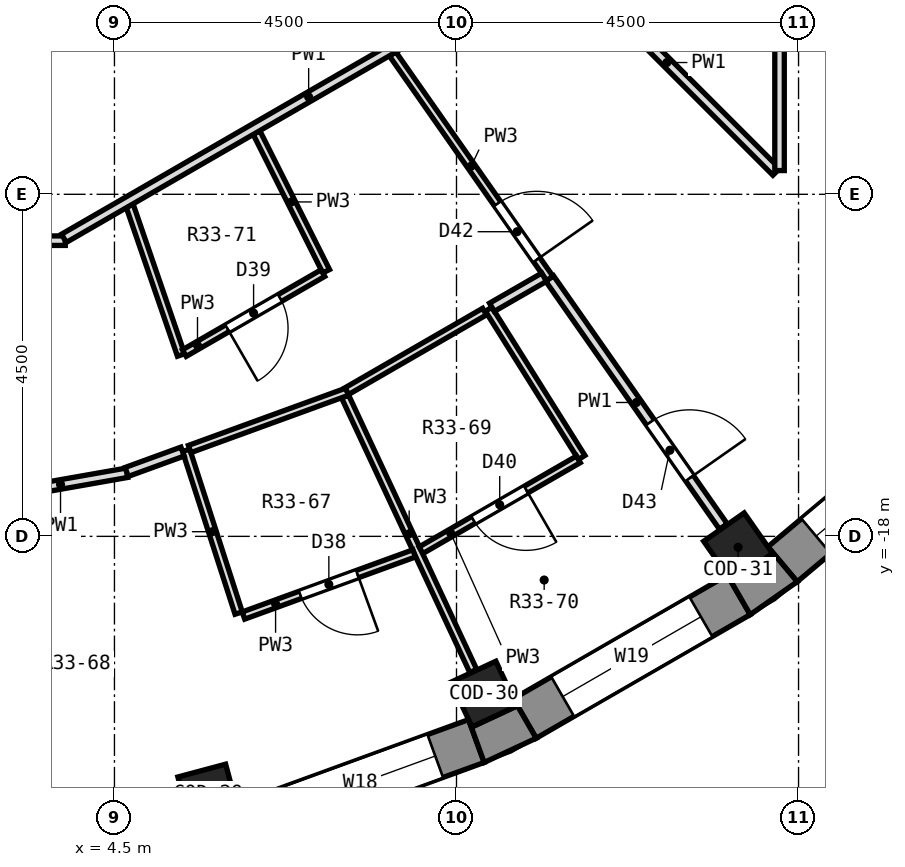
"""IFC4 building model, lengths in metres.
Left out: names, types, materials, properties, quantities, classifications, styles, units other than length and angle.
Written with IfcOpenShell. Run it as: python <this file> out.ifc"""

import sys

from ifc_helpers import new_model, si_unit, direction, frame, frame_2d, origin, origin_2d, place, context, subcontext, project, spatial, polyline, rectangle, outline, extrude, element, fill, save


model = new_model("IFC4")
c1 = context("Model", 3, precision=1e-05, world=origin(), true_north=direction((0.0, 1.0)))
c2 = subcontext(c1, "Body", "Model", "MODEL_VIEW")
j1 = project(units=[si_unit("LENGTHUNIT", "METRE"), si_unit("PLANEANGLEUNIT", "RADIAN")], contexts=[c1])
p1 = place(None, origin())
s1 = spatial("IfcSite", under=j1, at=p1, CompositionType="ELEMENT")
p2 = place(p1, origin())
s2 = spatial("IfcBuilding", under=s1, at=p2, CompositionType="ELEMENT")
p3 = place(p2, frame((0.0, 0.0, 229.7)))
s3 = spatial("IfcBuildingStorey", under=s2, at=p3, CompositionType="ELEMENT", Elevation=229.7)
for number, where, z_axis, x_axis in (
    (1, (5.733, -21.395, 0.0), (0.0, 0.0, 1.0), (0.259, -0.966, 0.0)),
    (2, (9.361, -20.075, 0.0), (0.0, 0.0, 1.0), (0.423, -0.906, 0.0)),
    (3, (12.705, -18.144, 0.0), (0.0, 0.0, 1.0), (0.574, -0.819, 0.0)),
):
    element("IfcColumn", number, at=place(p3, frame(where, z_axis=z_axis, x_axis=x_axis)), inside=s3, PredefinedType="COLUMN", context=c2, shape_type="SweptSolid", body=[
        extrude(rectangle(XDim=0.65, YDim=0.65, at=origin_2d()), origin(), (0.0, 0.0, 1.0), 3.3),
    ])
p4 = place(p3, frame((6.206, -21.805, 0.0), z_axis=(0.0, 0.0, 1.0), x_axis=(0.939679383794, 0.342056509473, 0.0)))
e4 = element("IfcWall", 4, at=p4, inside=s3, PredefinedType="SOLIDWALL", context=c2, shape_type="SweptSolid", body=[
    extrude(rectangle(XDim=3.252, YDim=0.6, at=frame_2d((1.626, 0.0))), origin(), (0.0, 0.0, 1.0), 2.9),
])
p5 = place(p4, frame((0.576, 0.0, 0.9)))
e5 = element("IfcOpeningElement", 5, at=p5, cuts=e4, PredefinedType="OPENING", context=c2, shape_type="SweptSolid", body=[
    extrude(rectangle(XDim=2.1, YDim=1.8, at=frame_2d((1.05, 0.9))), frame((0.0, 0.312, 0.0), z_axis=(0.0, -1.0, 0.0), x_axis=(1.0, 0.0, 0.0)), (0.0, 0.0, 1.0), 0.624),
])
p6 = place(p3, frame((9.898, -20.396, 0.0), z_axis=(0.0, 0.0, 1.0), x_axis=(0.866016800201, 0.500014901547, 0.0)))
e6 = element("IfcWall", 6, at=p6, inside=s3, PredefinedType="SOLIDWALL", context=c2, shape_type="SweptSolid", body=[
    extrude(rectangle(XDim=3.252, YDim=0.6, at=frame_2d((1.626, 0.0))), origin(), (0.0, 0.0, 1.0), 2.9),
])
p7 = place(p6, frame((0.576, 0.0, 0.9)))
e7 = element("IfcOpeningElement", 7, at=p7, cuts=e6, PredefinedType="OPENING", context=c2, shape_type="SweptSolid", body=[
    extrude(rectangle(XDim=2.1, YDim=1.8, at=frame_2d((1.05, 0.9))), frame((0.0, 0.312, 0.0), z_axis=(0.0, -1.0, 0.0), x_axis=(1.0, 0.0, 0.0)), (0.0, 0.0, 1.0), 0.624),
])
p8 = place(p3, frame((13.29, -18.367, 0.0), z_axis=(0.0, 0.0, 1.0), x_axis=(0.766056773982, 0.64277291405, 0.0)))
e8 = element("IfcWall", 8, at=p8, inside=s3, PredefinedType="SOLIDWALL", context=c2, shape_type="SweptSolid", body=[
    extrude(rectangle(XDim=3.252, YDim=0.6, at=frame_2d((1.626, 0.0))), origin(), (0.0, 0.0, 1.0), 2.9),
])
p9 = place(p8, frame((0.576, 0.0, 0.9)))
e9 = element("IfcOpeningElement", 9, at=p9, cuts=e8, PredefinedType="OPENING", context=c2, shape_type="SweptSolid", body=[
    extrude(rectangle(XDim=2.1, YDim=1.8, at=frame_2d((1.05, 0.9))), frame((0.0, 0.312, 0.0), z_axis=(0.0, -1.0, 0.0), x_axis=(1.0, 0.0, 0.0)), (0.0, 0.0, 1.0), 0.624),
])
p10 = place(p3, origin())
e10 = element("IfcWall", 10, at=p10, inside=s3, PredefinedType="SOLIDWALL", context=c2, shape_type="SweptSolid", body=[
    extrude(outline(polyline([(9.364, -20.975), (10.048, -20.656), (9.748, -20.136), (9.793, -20.232), (9.204, -20.507), (9.159, -20.411), (9.364, -20.975)])), origin(), (0.0, 0.0, 1.0), 2.9),
])
p11 = place(p3, origin())
e11 = element("IfcWall", 11, at=p11, inside=s3, PredefinedType="SOLIDWALL", context=c2, shape_type="SweptSolid", body=[
    extrude(outline(polyline([(12.864, -19.03), (13.482, -18.597), (13.097, -18.137), (13.157, -18.224), (12.625, -18.597), (12.564, -18.51), (12.864, -19.03)])), origin(), (0.0, 0.0, 1.0), 2.9),
])
p12 = place(p3, frame((5.443, -16.868, 0.0), z_axis=(0.0, 0.0, 1.0), x_axis=(0.307034478859, -0.951698391714, 0.0)))
e12 = element("IfcWall", 12, at=p12, inside=s3, PredefinedType="PARTITIONING", context=c2, shape_type="SweptSolid", body=[
    extrude(rectangle(XDim=2.25, YDim=0.1, at=frame_2d((1.125, 0.0))), origin(), (0.0, 0.0, 1.0), 2.9),
])
p13 = place(p3, frame((4.7, -13.65, 0.0), z_axis=(0.0, 0.0, 1.0), x_axis=(0.325276885577, -0.945618817341, 0.0)))
e13 = element("IfcWall", 13, at=p13, inside=s3, PredefinedType="PARTITIONING", context=c2, shape_type="SweptSolid", body=[
    extrude(rectangle(XDim=2.077, YDim=0.1, at=frame_2d((1.039, 0.0))), origin(), (0.0, 0.0, 1.0), 2.9),
])
p14 = place(p3, frame((7.534, -16.16, 0.0), z_axis=(0.0, 0.0, 1.0), x_axis=(0.423136981181, -0.90606572342, 0.0)))
e14 = element("IfcWall", 14, at=p14, inside=s3, PredefinedType="PARTITIONING", context=c2, shape_type="SweptSolid", body=[
    extrude(rectangle(XDim=3.985, YDim=0.1, at=frame_2d((1.993, 0.0))), origin(), (0.0, 0.0, 1.0), 2.9),
])
p15 = place(p3, frame((6.369, -12.688, 0.0), z_axis=(0.0, 0.0, 1.0), x_axis=(0.448648311547, -0.893708393463, 0.0)))
e15 = element("IfcWall", 15, at=p15, inside=s3, PredefinedType="PARTITIONING", context=c2, shape_type="SweptSolid", body=[
    extrude(rectangle(XDim=2.041, YDim=0.1, at=frame_2d((1.021, 0.0))), origin(), (0.0, 0.0, 1.0), 2.9),
])
p16 = place(p3, frame((9.423, -15.012, 0.0), z_axis=(0.0, 0.0, 1.0), x_axis=(0.531608930636, -0.846989931975, 0.0)))
e16 = element("IfcWall", 16, at=p16, inside=s3, PredefinedType="PARTITIONING", context=c2, shape_type="SweptSolid", body=[
    extrude(rectangle(XDim=2.302, YDim=0.1, at=frame_2d((1.151, 0.0))), origin(), (0.0, 0.0, 1.0), 2.9),
])
p17 = place(p3, frame((10.225, -14.607, 0.0), z_axis=(0.0, 0.0, 1.0), x_axis=(0.573696694948, -0.819067825156, 0.0)))
e17 = element("IfcWall", 17, at=p17, inside=s3, PredefinedType="PARTITIONING", context=c2, shape_type="SweptSolid", body=[
    extrude(rectangle(XDim=3.985, YDim=0.125, at=frame_2d((1.992, 0.0))), origin(), (0.0, 0.0, 1.0), 2.9),
])
p18 = place(p17, frame((2.309, 0.0, 0.0)))
e18 = element("IfcOpeningElement", 18, at=p18, cuts=e17, PredefinedType="OPENING", context=c2, shape_type="SweptSolid", body=[
    extrude(rectangle(XDim=0.9, YDim=2.1, at=frame_2d((0.45, 1.05))), frame((0.0, 0.074, 0.0), z_axis=(0.0, -1.0, 0.0), x_axis=(1.0, 0.0, 0.0)), (0.0, 0.0, 1.0), 0.149),
])
p19 = place(p3, frame((8.16, -11.654, 0.0), z_axis=(0.0, 0.0, 1.0), x_axis=(0.573580547772, -0.819149165426, 0.0)))
e19 = element("IfcWall", 19, at=p19, inside=s3, PredefinedType="PARTITIONING", context=c2, shape_type="SweptSolid", body=[
    extrude(rectangle(XDim=3.604, YDim=0.1, at=frame_2d((1.802, 0.0))), origin(), (0.0, 0.0, 1.0), 2.9),
])
p20 = place(p19, frame((2.405, 0.0, 0.0)))
e20 = element("IfcOpeningElement", 20, at=p20, cuts=e19, PredefinedType="OPENING", context=c2, shape_type="SweptSolid", body=[
    extrude(rectangle(XDim=0.9, YDim=2.1, at=frame_2d((0.45, 1.05))), frame((0.0, 0.062, 0.0), z_axis=(0.0, -1.0, 0.0), x_axis=(1.0, 0.0, 0.0)), (0.0, 0.0, 1.0), 0.124),
])
p21 = place(p3, frame((10.33, -10.328, 0.0), z_axis=(0.0, 0.0, 1.0), x_axis=(0.707076776443, -0.707136784657, 0.0)))
e21 = element("IfcWall", 21, at=p21, inside=s3, PredefinedType="PARTITIONING", context=c2, shape_type="SweptSolid", body=[
    extrude(rectangle(XDim=4.068, YDim=0.125, at=frame_2d((2.034, 0.0))), origin(), (0.0, 0.0, 1.0), 2.9),
])
p22 = place(p3, frame((-3.719, -14.11, 0.0), z_axis=(0.0, 0.0, 1.0), x_axis=(1.0, 0.0, 0.0)))
e22 = element("IfcWall", 22, at=p22, inside=s3, PredefinedType="PARTITIONING", context=c2, shape_type="SweptSolid", body=[
    extrude(rectangle(XDim=7.572, YDim=0.125, at=frame_2d((3.786, 0.0))), origin(), (0.0, 0.0, 1.0), 2.9),
])
p23 = place(p22, frame((0.926, 0.0, 0.0)))
e23 = element("IfcOpeningElement", 23, at=p23, cuts=e22, PredefinedType="OPENING", context=c2, shape_type="SweptSolid", body=[
    extrude(rectangle(XDim=1.0, YDim=2.1, at=frame_2d((0.5, 1.05))), frame((0.0, 0.074, 0.0), z_axis=(0.0, -1.0, 0.0), x_axis=(1.0, 0.0, 0.0)), (0.0, 0.0, 1.0), 0.149),
])
p24 = place(p22, frame((4.492, 0.0, 0.0)))
e24 = element("IfcOpeningElement", 24, at=p24, cuts=e22, PredefinedType="OPENING", context=c2, shape_type="SweptSolid", body=[
    extrude(rectangle(XDim=1.0, YDim=2.1, at=frame_2d((0.5, 1.05))), frame((0.0, 0.074, 0.0), z_axis=(0.0, -1.0, 0.0), x_axis=(1.0, 0.0, 0.0)), (0.0, 0.0, 1.0), 0.149),
])
p25 = place(p3, frame((1.624, -17.699, 0.0), z_axis=(0.0, 0.0, 1.0), x_axis=(0.98485035276, 0.17340640896, 0.0)))
e25 = element("IfcWall", 25, at=p25, inside=s3, PredefinedType="PARTITIONING", context=c2, shape_type="SweptSolid", body=[
    extrude(rectangle(XDim=3.088, YDim=0.125, at=frame_2d((1.544, 0.0))), origin(), (0.0, 0.0, 1.0), 2.9),
])
p26 = place(p25, frame((1.024, 0.0, 0.0)))
e26 = element("IfcOpeningElement", 26, at=p26, cuts=e25, PredefinedType="OPENING", context=c2, shape_type="SweptSolid", body=[
    extrude(rectangle(XDim=0.9, YDim=2.1, at=frame_2d((0.45, 1.05))), frame((0.0, 0.074, 0.0), z_axis=(0.0, -1.0, 0.0), x_axis=(1.0, 0.0, 0.0)), (0.0, 0.0, 1.0), 0.149),
])
p27 = place(p3, frame((6.197, -19.042, 0.0), z_axis=(0.0, 0.0, 1.0), x_axis=(0.939644231496, 0.342153062556, 0.0)))
e27 = element("IfcWall", 27, at=p27, inside=s3, PredefinedType="PARTITIONING", context=c2, shape_type="SweptSolid", body=[
    extrude(rectangle(XDim=2.39, YDim=0.1, at=frame_2d((1.195, 0.0))), origin(), (0.0, 0.0, 1.0), 2.9),
])
p28 = place(p27, frame((0.796, 0.0, 0.0)))
e28 = element("IfcOpeningElement", 28, at=p28, cuts=e27, PredefinedType="OPENING", context=c2, shape_type="SweptSolid", body=[
    extrude(rectangle(XDim=0.8, YDim=2.1, at=frame_2d((0.4, 1.05))), frame((0.0, 0.062, 0.0), z_axis=(0.0, -1.0, 0.0), x_axis=(1.0, 0.0, 0.0)), (0.0, 0.0, 1.0), 0.124),
])
p29 = place(p3, frame((5.49, -16.851, 0.0), z_axis=(0.0, 0.0, 1.0), x_axis=(0.939680214162, 0.342054228323, 0.0)))
e29 = element("IfcWall", 29, at=p29, inside=s3, PredefinedType="PARTITIONING", context=c2, shape_type="SweptSolid", body=[
    extrude(rectangle(XDim=2.205, YDim=0.1, at=frame_2d((1.103, 0.0))), origin(), (0.0, 0.0, 1.0), 2.9),
])
p30 = place(p3, frame((4.661, -17.153, 0.0), z_axis=(0.0, 0.0, 1.0), x_axis=(0.93962024549, 0.342218927391, 0.0)))
e30 = element("IfcWall", 30, at=p30, inside=s3, PredefinedType="PARTITIONING", context=c2, shape_type="SweptSolid", body=[
    extrude(rectangle(XDim=0.783, YDim=0.125, at=frame_2d((0.391, 0.0))), origin(), (0.0, 0.0, 1.0), 2.9),
])
p31 = place(p3, frame((9.466, -14.986, 0.0), z_axis=(0.0, 0.0, 1.0), x_axis=(0.866569975824, 0.499055585082, 0.0)))
e31 = element("IfcWall", 31, at=p31, inside=s3, PredefinedType="PARTITIONING", context=c2, shape_type="SweptSolid", body=[
    extrude(rectangle(XDim=0.792, YDim=0.125, at=frame_2d((0.396, 0.0))), origin(), (0.0, 0.0, 1.0), 2.9),
])
p32 = place(p3, frame((8.533, -18.182, 0.0), z_axis=(0.0, 0.0, 1.0), x_axis=(0.866136275394, 0.49980791555, 0.0)))
e32 = element("IfcWall", 32, at=p32, inside=s3, PredefinedType="PARTITIONING", context=c2, shape_type="SweptSolid", body=[
    extrude(rectangle(XDim=2.391, YDim=0.1, at=frame_2d((1.195, 0.0))), origin(), (0.0, 0.0, 1.0), 2.9),
])
p33 = place(p32, frame((0.795, 0.0, 0.0)))
e33 = element("IfcOpeningElement", 33, at=p33, cuts=e32, PredefinedType="OPENING", context=c2, shape_type="SweptSolid", body=[
    extrude(rectangle(XDim=0.8, YDim=2.1, at=frame_2d((0.4, 1.05))), frame((0.0, 0.062, 0.0), z_axis=(0.0, -1.0, 0.0), x_axis=(1.0, 0.0, 0.0)), (0.0, 0.0, 1.0), 0.124),
])
p34 = place(p3, frame((7.557, -16.089, 0.0), z_axis=(0.0, 0.0, 1.0), x_axis=(0.866022320763, 0.500005339912, 0.0)))
e34 = element("IfcWall", 34, at=p34, inside=s3, PredefinedType="PARTITIONING", context=c2, shape_type="SweptSolid", body=[
    extrude(rectangle(XDim=2.092, YDim=0.1, at=frame_2d((1.046, 0.0))), origin(), (0.0, 0.0, 1.0), 2.9),
])
p35 = place(p3, frame((5.419, -15.589, 0.0), z_axis=(0.0, 0.0, 1.0), x_axis=(0.866071606143, 0.499919966627, 0.0)))
e35 = element("IfcWall", 35, at=p35, inside=s3, PredefinedType="PARTITIONING", context=c2, shape_type="SweptSolid", body=[
    extrude(rectangle(XDim=2.104, YDim=0.1, at=frame_2d((1.052, 0.0))), origin(), (0.0, 0.0, 1.0), 2.9),
])
p36 = place(p35, frame((0.652, 0.0, 0.0)))
e36 = element("IfcOpeningElement", 36, at=p36, cuts=e35, PredefinedType="OPENING", context=c2, shape_type="SweptSolid", body=[
    extrude(rectangle(XDim=0.8, YDim=2.1, at=frame_2d((0.4, 1.05))), frame((0.0, 0.062, 0.0), z_axis=(0.0, -1.0, 0.0), x_axis=(1.0, 0.0, 0.0)), (0.0, 0.0, 1.0), 0.124),
])
p37 = place(p3, frame((3.835, -14.079, 0.0), z_axis=(0.0, 0.0, 1.0), x_axis=(0.865993671729, 0.500054957505, 0.0)))
e37 = element("IfcWall", 37, at=p37, inside=s3, PredefinedType="PARTITIONING", context=c2, shape_type="SweptSolid", body=[
    extrude(rectangle(XDim=7.436, YDim=0.125, at=frame_2d((3.718, 0.0))), origin(), (0.0, 0.0, 1.0), 2.9),
])
p38 = place(p3, frame((3.203, -11.673, 0.0), z_axis=(0.0, 0.0, 1.0), x_axis=(0.865972267571, 0.50009202333, 0.0)))
e38 = element("IfcWall", 38, at=p38, inside=s3, PredefinedType="PARTITIONING", context=c2, shape_type="SweptSolid", body=[
    extrude(rectangle(XDim=6.137, YDim=0.125, at=frame_2d((3.069, 0.0))), origin(), (0.0, 0.0, 1.0), 2.9),
])
p39 = place(p38, frame((2.512, 0.0, 0.0)))
e39 = element("IfcOpeningElement", 39, at=p39, cuts=e38, PredefinedType="OPENING", context=c2, shape_type="SweptSolid", body=[
    extrude(rectangle(XDim=1.0, YDim=2.1, at=frame_2d((0.5, 1.05))), frame((0.0, 0.074, 0.0), z_axis=(0.0, -1.0, 0.0), x_axis=(1.0, 0.0, 0.0)), (0.0, 0.0, 1.0), 0.149),
])
p40 = place(p3, frame((13.25, -13.188, 0.0), z_axis=(0.0, 0.0, 1.0), x_axis=(0.0, 1.0, 0.0)))
e40 = element("IfcWall", 40, at=p40, inside=s3, PredefinedType="PARTITIONING", context=c2, shape_type="SweptSolid", body=[
    extrude(rectangle(XDim=3.938, YDim=0.125, at=frame_2d((1.969, 0.0))), origin(), (0.0, 0.0, 1.0), 2.9),
])
p41 = place(p5, origin())
e41 = element("IfcWindow", 41, at=p41, inside=s3, PartitioningType="SINGLE_PANEL", PredefinedType="WINDOW", context=c2, shape_type="SweptSolid", body=[
    extrude(rectangle(XDim=2.1, YDim=1.8, at=frame_2d((1.05, 0.9))), frame((0.0, 0.18, 0.0), z_axis=(0.0, -1.0, 0.0), x_axis=(1.0, 0.0, 0.0)), (0.0, 0.0, 1.0), 0.06),
])
fill(e5, e41)
p42 = place(p7, origin())
e42 = element("IfcWindow", 42, at=p42, inside=s3, PartitioningType="SINGLE_PANEL", PredefinedType="WINDOW", context=c2, shape_type="SweptSolid", body=[
    extrude(rectangle(XDim=2.1, YDim=1.8, at=frame_2d((1.05, 0.9))), frame((0.0, 0.18, 0.0), z_axis=(0.0, -1.0, 0.0), x_axis=(1.0, 0.0, 0.0)), (0.0, 0.0, 1.0), 0.06),
])
fill(e7, e42)
p43 = place(p9, origin())
e43 = element("IfcWindow", 43, at=p43, inside=s3, PartitioningType="SINGLE_PANEL", PredefinedType="WINDOW", context=c2, shape_type="SweptSolid", body=[
    extrude(rectangle(XDim=2.1, YDim=1.8, at=frame_2d((1.05, 0.9))), frame((0.0, 0.18, 0.0), z_axis=(0.0, -1.0, 0.0), x_axis=(1.0, 0.0, 0.0)), (0.0, 0.0, 1.0), 0.06),
])
fill(e9, e43)
p44 = place(p28, frame((0.8, 0.0, 0.0), z_axis=(0.0, 0.0, 1.0), x_axis=(-1.0, 0.0, 0.0)))
e44 = element("IfcDoor", 44, at=p44, inside=s3, OperationType="SINGLE_SWING_LEFT", PredefinedType="DOOR", context=c2, shape_type="SweptSolid", body=[
    extrude(rectangle(XDim=0.8, YDim=2.1, at=frame_2d((0.4, 1.05))), frame((0.0, 0.025, 0.0), z_axis=(0.0, -1.0, 0.0), x_axis=(1.0, 0.0, 0.0)), (0.0, 0.0, 1.0), 0.05),
])
fill(e28, e44)
p45 = place(p36, frame((0.8, 0.0, 0.0), z_axis=(0.0, 0.0, 1.0), x_axis=(-1.0, 0.0, 0.0)))
e45 = element("IfcDoor", 45, at=p45, inside=s3, OperationType="SINGLE_SWING_RIGHT", PredefinedType="DOOR", context=c2, shape_type="SweptSolid", body=[
    extrude(rectangle(XDim=0.8, YDim=2.1, at=frame_2d((0.4, 1.05))), frame((0.0, 0.025, 0.0), z_axis=(0.0, -1.0, 0.0), x_axis=(1.0, 0.0, 0.0)), (0.0, 0.0, 1.0), 0.05),
])
fill(e36, e45)
p46 = place(p33, frame((0.8, 0.0, 0.0), z_axis=(0.0, 0.0, 1.0), x_axis=(-1.0, 0.0, 0.0)))
e46 = element("IfcDoor", 46, at=p46, inside=s3, OperationType="SINGLE_SWING_LEFT", PredefinedType="DOOR", context=c2, shape_type="SweptSolid", body=[
    extrude(rectangle(XDim=0.8, YDim=2.1, at=frame_2d((0.4, 1.05))), frame((0.0, 0.025, 0.0), z_axis=(0.0, -1.0, 0.0), x_axis=(1.0, 0.0, 0.0)), (0.0, 0.0, 1.0), 0.05),
])
fill(e33, e46)
p47 = place(p20, origin())
e47 = element("IfcDoor", 47, at=p47, inside=s3, OperationType="SINGLE_SWING_RIGHT", PredefinedType="DOOR", context=c2, shape_type="SweptSolid", body=[
    extrude(rectangle(XDim=0.9, YDim=2.1, at=frame_2d((0.45, 1.05))), frame((0.0, 0.025, 0.0), z_axis=(0.0, -1.0, 0.0), x_axis=(1.0, 0.0, 0.0)), (0.0, 0.0, 1.0), 0.05),
])
fill(e20, e47)
p48 = place(p18, origin())
e48 = element("IfcDoor", 48, at=p48, inside=s3, OperationType="SINGLE_SWING_RIGHT", PredefinedType="DOOR", context=c2, shape_type="SweptSolid", body=[
    extrude(rectangle(XDim=0.9, YDim=2.1, at=frame_2d((0.45, 1.05))), frame((0.0, 0.025, 0.0), z_axis=(0.0, -1.0, 0.0), x_axis=(1.0, 0.0, 0.0)), (0.0, 0.0, 1.0), 0.05),
])
fill(e18, e48)
save(model, sys.argv[1])
